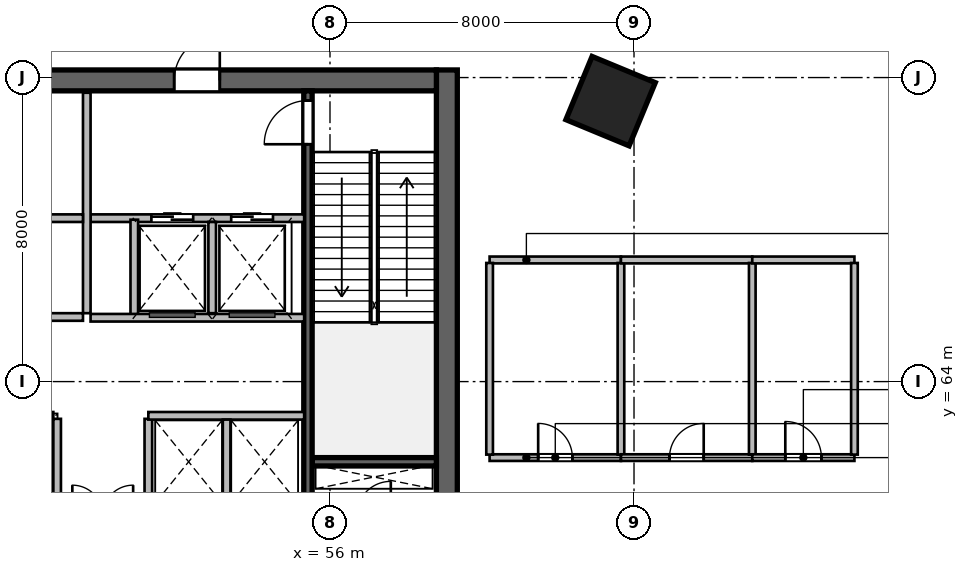
"""IFC4 building model, lengths in metres.
Left out: names, types, materials, properties, quantities, classifications, styles, units other than length and angle.
Written with IfcOpenShell. Run it as: python <this file> out.ifc"""

import sys

from ifc_helpers import new_model, si_unit, direction, frame, frame_2d, origin, origin_2d, place, context, subcontext, project, spatial, rectangle, extrude, source, transform, mapped, element, fill, save


model = new_model("IFC4")
c1 = context("Model", 3, precision=1e-05, world=origin(), true_north=direction((0.0, 1.0)))
c2 = subcontext(c1, "Body", "Model", "MODEL_VIEW")
j1 = project(units=[si_unit("LENGTHUNIT", "METRE"), si_unit("PLANEANGLEUNIT", "RADIAN")], contexts=[c1])
p1 = place(None, origin())
s1 = spatial("IfcSite", under=j1, at=p1, CompositionType="ELEMENT")
p2 = place(p1, origin())
s2 = spatial("IfcBuilding", under=s1, at=p2, CompositionType="ELEMENT")
p3 = place(p2, frame((0.0, 0.0, 18.0)))
s3 = spatial("IfcBuildingStorey", under=s2, at=p3, CompositionType="ELEMENT", Elevation=18.0)
m1 = source(origin(), c2, "Body", "SweptSolid", [
    extrude(rectangle(XDim=12.0, YDim=0.55, at=frame_2d((6.0, 0.0))), origin(), (0.0, 0.0, 1.0), 6.0),
])
p4 = place(p3, frame((59.075, 60.2, 0.0), z_axis=(0.0, 0.0, 1.0), x_axis=(0.0, 1.0, 0.0)))
e1 = element("IfcWall", 1, at=p4, inside=s3, PredefinedType="SHEAR", context=c2, shape_type="MappedRepresentation", body=[
    mapped(m1, transform((0.0, 0.0, 0.0), scale=1.0)),
])
m2 = source(origin(), c2, "Body", "SweptSolid", [
    extrude(rectangle(XDim=21.6, YDim=0.55, at=frame_2d((10.8, 0.0))), origin(), (0.0, 0.0, 1.0), 6.0),
])
p5 = place(p3, frame((37.2, 71.925, 0.0), z_axis=(0.0, 0.0, 1.0), x_axis=(1.0, 0.0, 0.0)))
e2 = element("IfcWall", 2, at=p5, inside=s3, PredefinedType="SHEAR", context=c2, shape_type="MappedRepresentation", body=[
    mapped(m2, transform((0.0, 0.0, 0.0), scale=1.0)),
])
p6 = place(p5, frame((1.2, 0.0, 0.0)))
e3 = element("IfcOpeningElement", 3, at=p6, cuts=e2, PredefinedType="OPENING", context=c2, shape_type="SweptSolid", body=[
    extrude(rectangle(XDim=0.9, YDim=2.1, at=frame_2d((0.45, 1.05))), frame((0.0, 0.285, 0.0), z_axis=(0.0, -1.0, 0.0), x_axis=(1.0, 0.0, 0.0)), (0.0, 0.0, 1.0), 0.57),
])
p7 = place(p5, frame((14.7, 0.0, 0.0)))
e4 = element("IfcOpeningElement", 4, at=p7, cuts=e2, PredefinedType="OPENING", context=c2, shape_type="SweptSolid", body=[
    extrude(rectangle(XDim=1.2, YDim=2.15, at=frame_2d((0.6, 1.075))), frame((0.0, 0.285, 0.0), z_axis=(0.0, -1.0, 0.0), x_axis=(1.0, 0.0, 0.0)), (0.0, 0.0, 1.0), 0.57),
])
p8 = place(p5, frame((4.15, 0.0, 0.0)))
e5 = element("IfcOpeningElement", 5, at=p8, cuts=e2, PredefinedType="OPENING", context=c2, shape_type="SweptSolid", body=[
    extrude(rectangle(XDim=1.3, YDim=2.15, at=frame_2d((0.65, 1.075))), frame((0.0, 0.285, 0.0), z_axis=(0.0, -1.0, 0.0), x_axis=(1.0, 0.0, 0.0)), (0.0, 0.0, 1.0), 0.57),
])
p9 = place(p5, frame((7.1, 0.0, 0.0)))
e6 = element("IfcOpeningElement", 6, at=p9, cuts=e2, PredefinedType="OPENING", context=c2, shape_type="SweptSolid", body=[
    extrude(rectangle(XDim=0.9, YDim=2.1, at=frame_2d((0.45, 1.05))), frame((0.0, 0.285, 0.0), z_axis=(0.0, -1.0, 0.0), x_axis=(1.0, 0.0, 0.0)), (0.0, 0.0, 1.0), 0.57),
])
m3 = source(origin(), c2, "Body", "SweptSolid", [
    extrude(rectangle(XDim=3.27, YDim=0.22, at=frame_2d((1.635, 0.0))), origin(), (0.0, 0.0, 1.0), 6.0),
])
p10 = place(p3, frame((55.53, 61.89, 0.0), z_axis=(0.0, 0.0, 1.0), x_axis=(1.0, 0.0, 0.0)))
e7 = element("IfcWall", 7, at=p10, inside=s3, PredefinedType="SHEAR", context=c2, shape_type="MappedRepresentation", body=[
    mapped(m3, transform((0.0, 0.0, 0.0), scale=1.0)),
])
m4 = source(origin(), c2, "Body", "SweptSolid", [
    extrude(rectangle(XDim=10.9, YDim=0.22, at=frame_2d((5.45, 0.0))), origin(), (0.0, 0.0, 1.0), 6.0),
])
p11 = place(p3, frame((55.42, 60.75, 0.0), z_axis=(0.0, 0.0, 1.0), x_axis=(0.0, 1.0, 0.0)))
e8 = element("IfcWall", 8, at=p11, inside=s3, PredefinedType="SHEAR", context=c2, shape_type="MappedRepresentation", body=[
    mapped(m4, transform((0.0, 0.0, 0.0), scale=1.0)),
])
p12 = place(p11, frame((9.495, 0.0, 0.0)))
e9 = element("IfcOpeningElement", 9, at=p12, cuts=e8, PredefinedType="OPENING", context=c2, shape_type="SweptSolid", body=[
    extrude(rectangle(XDim=1.15, YDim=2.15, at=frame_2d((0.575, 1.075))), frame((0.0, 0.12, 0.0), z_axis=(0.0, -1.0, 0.0), x_axis=(1.0, 0.0, 0.0)), (0.0, 0.0, 1.0), 0.24),
])
m5 = source(origin(), c2, "Body", "SweptSolid", [
    extrude(rectangle(XDim=1.8, YDim=1.8, at=origin_2d()), origin(), (0.0, 0.0, 1.0), 6.0),
])
p13 = place(p3, frame((63.384, 71.379, 0.0), z_axis=(0.0, 0.0, 1.0), x_axis=(0.382683432365, 0.923879532511, 0.0)))
e10 = element("IfcColumn", 10, at=p13, inside=s3, PredefinedType="COLUMN", context=c2, shape_type="MappedRepresentation", body=[
    mapped(m5, transform((0.0, 0.0, 0.0), scale=1.0)),
])
m6 = source(origin(), c2, "Body", "SweptSolid", [
    extrude(rectangle(XDim=5.667, YDim=0.35, at=frame_2d((2.833, 0.0))), origin(), (0.0, 0.0, 1.0), 5.62),
])
p14 = place(p3, frame((75.698, 72.147, 0.0), z_axis=(0.0, 0.0, 1.0), x_axis=(-0.873233089296, 0.487302751642, 0.0)))
e11 = element("IfcWall", 11, at=p14, inside=s3, PredefinedType="SOLIDWALL", context=c2, shape_type="MappedRepresentation", body=[
    mapped(m6, transform((0.0, 0.0, 0.0), scale=1.0)),
])
m7 = source(origin(), c2, "Body", "SweptSolid", [
    extrude(rectangle(XDim=2.24, YDim=0.2, at=frame_2d((1.12, 0.0))), origin(), (0.0, 0.0, 1.0), 5.62),
])
for number, where, z_axis, x_axis in (
    (12, (48.82, 60.78, 0.0), (0.0, 0.0, 1.0), (0.0, 1.0, 0.0)),
    (13, (51.22, 60.78, 0.0), (0.0, 0.0, 1.0), (0.0, 1.0, 0.0)),
):
    element("IfcWall", number, at=place(p3, frame(where, z_axis=z_axis, x_axis=x_axis)), inside=s3, PredefinedType="SOLIDWALL", context=c2, shape_type="MappedRepresentation", body=[
        mapped(m7, transform((0.0, 0.0, 0.0), scale=1.0)),
    ])
m8 = source(origin(), c2, "Body", "SweptSolid", [
    extrude(rectangle(XDim=5.62, YDim=0.2, at=frame_2d((2.81, 0.0))), origin(), (0.0, 0.0, 1.0), 5.62),
])
p15 = place(p3, frame((49.7, 68.3, 0.0), z_axis=(0.0, 0.0, 1.0), x_axis=(1.0, 0.0, 0.0)))
e14 = element("IfcWall", 14, at=p15, inside=s3, PredefinedType="SOLIDWALL", context=c2, shape_type="MappedRepresentation", body=[
    mapped(m8, transform((0.0, 0.0, 0.0), scale=1.0)),
])
p16 = place(p15, frame((1.6, 0.0, 0.0)))
e15 = element("IfcOpeningElement", 15, at=p16, cuts=e14, PredefinedType="OPENING", context=c2, shape_type="SweptSolid", body=[
    extrude(rectangle(XDim=1.1, YDim=2.15, at=frame_2d((0.55, 1.075))), frame((0.0, 0.11, 0.0), z_axis=(0.0, -1.0, 0.0), x_axis=(1.0, 0.0, 0.0)), (0.0, 0.0, 1.0), 0.22),
])
p17 = place(p15, frame((3.7, 0.0, 0.0)))
e16 = element("IfcOpeningElement", 16, at=p17, cuts=e14, PredefinedType="OPENING", context=c2, shape_type="SweptSolid", body=[
    extrude(rectangle(XDim=1.1, YDim=2.15, at=frame_2d((0.55, 1.075))), frame((0.0, 0.11, 0.0), z_axis=(0.0, -1.0, 0.0), x_axis=(1.0, 0.0, 0.0)), (0.0, 0.0, 1.0), 0.22),
])
m9 = source(origin(), c2, "Body", "SweptSolid", [
    extrude(rectangle(XDim=5.8, YDim=0.2, at=frame_2d((2.9, 0.0))), origin(), (0.0, 0.0, 1.0), 5.62),
])
p18 = place(p3, frame((49.6, 65.8, 0.0), z_axis=(0.0, 0.0, 1.0), x_axis=(0.0, 1.0, 0.0)))
e17 = element("IfcWall", 17, at=p18, inside=s3, PredefinedType="SOLIDWALL", context=c2, shape_type="MappedRepresentation", body=[
    mapped(m9, transform((0.0, 0.0, 0.0), scale=1.0)),
])
m10 = source(origin(), c2, "Body", "SweptSolid", [
    extrude(rectangle(XDim=2.58, YDim=0.2, at=frame_2d((1.29, 0.0))), origin(), (0.0, 0.0, 1.0), 5.62),
])
p19 = place(p3, frame((50.85, 65.68, 0.0), z_axis=(0.0, 0.0, 1.0), x_axis=(0.0, 1.0, 0.0)))
e18 = element("IfcWall", 18, at=p19, inside=s3, PredefinedType="SOLIDWALL", context=c2, shape_type="MappedRepresentation", body=[
    mapped(m10, transform((0.0, 0.0, 0.0), scale=1.0)),
])
m11 = source(origin(), c2, "Body", "SweptSolid", [
    extrude(rectangle(XDim=2.4, YDim=0.2, at=frame_2d((1.2, 0.0))), origin(), (0.0, 0.0, 1.0), 5.62),
])
p20 = place(p3, frame((52.9, 65.8, 0.0), z_axis=(0.0, 0.0, 1.0), x_axis=(0.0, 1.0, 0.0)))
e19 = element("IfcWall", 19, at=p20, inside=s3, PredefinedType="SOLIDWALL", context=c2, shape_type="MappedRepresentation", body=[
    mapped(m11, transform((0.0, 0.0, 0.0), scale=1.0)),
])
p21 = place(p3, frame((49.7, 65.68, 0.0), z_axis=(0.0, 0.0, 1.0), x_axis=(1.0, 0.0, 0.0)))
e20 = element("IfcWall", 20, at=p21, inside=s3, PredefinedType="SOLIDWALL", context=c2, shape_type="MappedRepresentation", body=[
    mapped(m8, transform((0.0, 0.0, 0.0), scale=1.0)),
])
m12 = source(origin(), c2, "Body", "SweptSolid", [
    extrude(rectangle(XDim=8.8, YDim=0.2, at=frame_2d((4.4, 0.0))), origin(), (0.0, 0.0, 1.0), 5.62),
])
p22 = place(p3, frame((40.7, 68.3, 0.0), z_axis=(0.0, 0.0, 1.0), x_axis=(1.0, 0.0, 0.0)))
e21 = element("IfcWall", 21, at=p22, inside=s3, PredefinedType="SOLIDWALL", context=c2, shape_type="MappedRepresentation", body=[
    mapped(m12, transform((0.0, 0.0, 0.0), scale=1.0)),
])
m13 = source(origin(), c2, "Body", "SweptSolid", [
    extrude(rectangle(XDim=8.02, YDim=0.2, at=frame_2d((4.01, 0.0))), origin(), (0.0, 0.0, 1.0), 5.62),
])
p23 = place(p3, frame((40.7, 63.1, 0.0), z_axis=(0.0, 0.0, 1.0), x_axis=(1.0, 0.0, 0.0)))
e22 = element("IfcWall", 22, at=p23, inside=s3, PredefinedType="SOLIDWALL", context=c2, shape_type="MappedRepresentation", body=[
    mapped(m13, transform((0.0, 0.0, 0.0), scale=1.0)),
])
p24 = place(p23, frame((0.72, 0.0, 0.0)))
e23 = element("IfcOpeningElement", 23, at=p24, cuts=e22, PredefinedType="OPENING", context=c2, shape_type="SweptSolid", body=[
    extrude(rectangle(XDim=1.0, YDim=2.15, at=frame_2d((0.5, 1.075))), frame((0.0, 0.11, 0.0), z_axis=(0.0, -1.0, 0.0), x_axis=(1.0, 0.0, 0.0)), (0.0, 0.0, 1.0), 0.22),
])
p25 = place(p23, frame((2.62, 0.0, 0.0)))
e24 = element("IfcOpeningElement", 24, at=p25, cuts=e22, PredefinedType="OPENING", context=c2, shape_type="SweptSolid", body=[
    extrude(rectangle(XDim=1.0, YDim=2.15, at=frame_2d((0.5, 1.075))), frame((0.0, 0.11, 0.0), z_axis=(0.0, -1.0, 0.0), x_axis=(1.0, 0.0, 0.0)), (0.0, 0.0, 1.0), 0.22),
])
p26 = place(p23, frame((4.55, 0.0, 0.0)))
e25 = element("IfcOpeningElement", 25, at=p26, cuts=e22, PredefinedType="OPENING", context=c2, shape_type="SweptSolid", body=[
    extrude(rectangle(XDim=1.0, YDim=2.15, at=frame_2d((0.5, 1.075))), frame((0.0, 0.11, 0.0), z_axis=(0.0, -1.0, 0.0), x_axis=(1.0, 0.0, 0.0)), (0.0, 0.0, 1.0), 0.22),
])
p27 = place(p23, frame((6.55, 0.0, 0.0)))
e26 = element("IfcOpeningElement", 26, at=p27, cuts=e22, PredefinedType="OPENING", context=c2, shape_type="SweptSolid", body=[
    extrude(rectangle(XDim=1.0, YDim=2.15, at=frame_2d((0.5, 1.075))), frame((0.0, 0.11, 0.0), z_axis=(0.0, -1.0, 0.0), x_axis=(1.0, 0.0, 0.0)), (0.0, 0.0, 1.0), 0.22),
])
m14 = source(origin(), c2, "Body", "SweptSolid", [
    extrude(rectangle(XDim=4.1, YDim=0.2, at=frame_2d((2.05, 0.0))), origin(), (0.0, 0.0, 1.0), 5.62),
])
p28 = place(p3, frame((51.22, 63.1, 0.0), z_axis=(0.0, 0.0, 1.0), x_axis=(1.0, 0.0, 0.0)))
e27 = element("IfcWall", 27, at=p28, inside=s3, PredefinedType="SOLIDWALL", context=c2, shape_type="MappedRepresentation", body=[
    mapped(m14, transform((0.0, 0.0, 0.0), scale=1.0)),
])
m15 = source(origin(), c2, "Body", "SweptSolid", [
    extrude(rectangle(XDim=2.2, YDim=0.2, at=frame_2d((1.1, 0.0))), origin(), (0.0, 0.0, 1.0), 5.62),
])
p29 = place(p3, frame((53.28, 60.8, 0.0), z_axis=(0.0, 0.0, 1.0), x_axis=(0.0, 1.0, 0.0)))
e28 = element("IfcWall", 28, at=p29, inside=s3, PredefinedType="SOLIDWALL", context=c2, shape_type="MappedRepresentation", body=[
    mapped(m15, transform((0.0, 0.0, 0.0), scale=1.0)),
])
p30 = place(p3, frame((40.7, 65.7, 0.0), z_axis=(0.0, 0.0, 1.0), x_axis=(1.0, 0.0, 0.0)))
e29 = element("IfcWall", 29, at=p30, inside=s3, PredefinedType="SOLIDWALL", context=c2, shape_type="MappedRepresentation", body=[
    mapped(m12, transform((0.0, 0.0, 0.0), scale=1.0)),
])
p31 = place(p30, frame((3.8, 0.0, 0.0)))
e30 = element("IfcOpeningElement", 30, at=p31, cuts=e29, PredefinedType="OPENING", context=c2, shape_type="SweptSolid", body=[
    extrude(rectangle(XDim=0.95, YDim=2.15, at=frame_2d((0.475, 1.075))), frame((0.0, 0.11, 0.0), z_axis=(0.0, -1.0, 0.0), x_axis=(1.0, 0.0, 0.0)), (0.0, 0.0, 1.0), 0.22),
])
m16 = source(origin(), c2, "Body", "SweptSolid", [
    extrude(rectangle(XDim=3.456, YDim=0.175, at=frame_2d((1.728, 0.0))), origin(), (0.0, 0.0, 1.0), 5.62),
])
p32 = place(p3, frame((60.2, 62.0, 0.0), z_axis=(0.0, 0.0, 1.0), x_axis=(1.0, 0.0, 0.0)))
e31 = element("IfcWall", 31, at=p32, inside=s3, PredefinedType="PARTITIONING", context=c2, shape_type="MappedRepresentation", body=[
    mapped(m16, transform((0.0, 0.0, 0.0), scale=1.0)),
])
p33 = place(p32, frame((1.278, 0.0, 0.0)))
e32 = element("IfcOpeningElement", 32, at=p33, cuts=e31, PredefinedType="OPENING", context=c2, shape_type="SweptSolid", body=[
    extrude(rectangle(XDim=0.9, YDim=2.08, at=frame_2d((0.45, 1.04))), frame((0.0, 0.098, 0.0), z_axis=(0.0, -1.0, 0.0), x_axis=(1.0, 0.0, 0.0)), (0.0, 0.0, 1.0), 0.195),
])
m17 = source(origin(), c2, "Body", "SweptSolid", [
    extrude(rectangle(XDim=3.456, YDim=0.18, at=frame_2d((1.728, 0.0))), origin(), (0.0, 0.0, 1.0), 5.62),
])
p34 = place(p3, frame((60.2, 67.2, 0.0), z_axis=(0.0, 0.0, 1.0), x_axis=(1.0, 0.0, 0.0)))
e33 = element("IfcWall", 33, at=p34, inside=s3, PredefinedType="PLUMBINGWALL", context=c2, shape_type="MappedRepresentation", body=[
    mapped(m17, transform((0.0, 0.0, 0.0), scale=1.0)),
])
m18 = source(origin(), c2, "Body", "SweptSolid", [
    extrude(rectangle(XDim=5.043, YDim=0.175, at=frame_2d((2.521, 0.0))), origin(), (0.0, 0.0, 1.0), 5.62),
])
for number, where, z_axis, x_axis in (
    (34, (60.2, 62.079, 0.0), (0.0, 0.0, 1.0), (0.0, 1.0, 0.0)),
    (35, (63.656, 62.079, 0.0), (0.0, 0.0, 1.0), (0.0, 1.0, 0.0)),
):
    element("IfcWall", number, at=place(p3, frame(where, z_axis=z_axis, x_axis=x_axis)), inside=s3, PredefinedType="PARTITIONING", context=c2, shape_type="MappedRepresentation", body=[
        mapped(m18, transform((0.0, 0.0, 0.0), scale=1.0)),
    ])
p35 = place(p3, frame((63.656, 62.0, 0.0), z_axis=(0.0, 0.0, 1.0), x_axis=(1.0, 0.0, 0.0)))
e36 = element("IfcWall", 36, at=p35, inside=s3, PredefinedType="PARTITIONING", context=c2, shape_type="MappedRepresentation", body=[
    mapped(m16, transform((0.0, 0.0, 0.0), scale=1.0)),
])
p36 = place(p35, frame((1.278, 0.0, 0.0)))
e37 = element("IfcOpeningElement", 37, at=p36, cuts=e36, PredefinedType="OPENING", context=c2, shape_type="SweptSolid", body=[
    extrude(rectangle(XDim=0.9, YDim=2.08, at=frame_2d((0.45, 1.04))), frame((0.0, 0.098, 0.0), z_axis=(0.0, -1.0, 0.0), x_axis=(1.0, 0.0, 0.0)), (0.0, 0.0, 1.0), 0.195),
])
p37 = place(p3, frame((63.656, 67.2, 0.0), z_axis=(0.0, 0.0, 1.0), x_axis=(1.0, 0.0, 0.0)))
e38 = element("IfcWall", 38, at=p37, inside=s3, PredefinedType="PLUMBINGWALL", context=c2, shape_type="MappedRepresentation", body=[
    mapped(m17, transform((0.0, 0.0, 0.0), scale=1.0)),
])
p38 = place(p3, frame((67.112, 62.079, 0.0), z_axis=(0.0, 0.0, 1.0), x_axis=(0.0, 1.0, 0.0)))
e39 = element("IfcWall", 39, at=p38, inside=s3, PredefinedType="PARTITIONING", context=c2, shape_type="MappedRepresentation", body=[
    mapped(m18, transform((0.0, 0.0, 0.0), scale=1.0)),
])
m19 = source(origin(), c2, "Body", "SweptSolid", [
    extrude(rectangle(XDim=2.688, YDim=0.175, at=frame_2d((1.344, 0.0))), origin(), (0.0, 0.0, 1.0), 5.62),
])
p39 = place(p3, frame((67.112, 62.0, 0.0), z_axis=(0.0, 0.0, 1.0), x_axis=(1.0, 0.0, 0.0)))
e40 = element("IfcWall", 40, at=p39, inside=s3, PredefinedType="PARTITIONING", context=c2, shape_type="MappedRepresentation", body=[
    mapped(m19, transform((0.0, 0.0, 0.0), scale=1.0)),
])
p40 = place(p39, frame((0.869, 0.0, 0.0)))
e41 = element("IfcOpeningElement", 41, at=p40, cuts=e40, PredefinedType="OPENING", context=c2, shape_type="SweptSolid", body=[
    extrude(rectangle(XDim=0.95, YDim=2.12, at=frame_2d((0.475, 1.06))), frame((0.0, 0.098, 0.0), z_axis=(0.0, -1.0, 0.0), x_axis=(1.0, 0.0, 0.0)), (0.0, 0.0, 1.0), 0.195),
])
m20 = source(origin(), c2, "Body", "SweptSolid", [
    extrude(rectangle(XDim=2.688, YDim=0.18, at=frame_2d((1.344, 0.0))), origin(), (0.0, 0.0, 1.0), 5.62),
])
p41 = place(p3, frame((67.112, 67.2, 0.0), z_axis=(0.0, 0.0, 1.0), x_axis=(1.0, 0.0, 0.0)))
e42 = element("IfcWall", 42, at=p41, inside=s3, PredefinedType="PLUMBINGWALL", context=c2, shape_type="MappedRepresentation", body=[
    mapped(m20, transform((0.0, 0.0, 0.0), scale=1.0)),
])
p42 = place(p3, frame((69.8, 62.079, 0.0), z_axis=(0.0, 0.0, 1.0), x_axis=(0.0, 1.0, 0.0)))
e43 = element("IfcWall", 43, at=p42, inside=s3, PredefinedType="PARTITIONING", context=c2, shape_type="MappedRepresentation", body=[
    mapped(m18, transform((0.0, 0.0, 0.0), scale=1.0)),
])
m21 = source(origin(), c2, "Body", "SweptSolid", [
    extrude(rectangle(XDim=1.15, YDim=2.15, at=frame_2d((0.575, 1.075))), frame((0.0, 0.025, 0.0), z_axis=(0.0, -1.0, 0.0), x_axis=(1.0, 0.0, 0.0)), (0.0, 0.0, 1.0), 0.05),
])
p43 = place(p12, origin())
e44 = element("IfcDoor", 44, at=p43, inside=s3, OperationType="SINGLE_SWING_LEFT", PredefinedType="DOOR", context=c2, shape_type="MappedRepresentation", body=[
    mapped(m21, transform((0.0, 0.0, 0.0), scale=1.0)),
])
fill(e9, e44)
m22 = source(origin(), c2, "Body", "SweptSolid", [
    extrude(rectangle(XDim=1.2, YDim=2.15, at=frame_2d((0.6, 1.075))), frame((0.0, 0.025, 0.0), z_axis=(0.0, -1.0, 0.0), x_axis=(1.0, 0.0, 0.0)), (0.0, 0.0, 1.0), 0.05),
])
p44 = place(p7, origin())
e45 = element("IfcDoor", 45, at=p44, inside=s3, OperationType="SINGLE_SWING_RIGHT", PredefinedType="DOOR", context=c2, shape_type="MappedRepresentation", body=[
    mapped(m22, transform((0.0, 0.0, 0.0), scale=1.0)),
])
fill(e4, e45)
m23 = source(origin(), c2, "Body", "SweptSolid", [
    extrude(rectangle(XDim=1.1, YDim=2.15, at=frame_2d((0.55, 1.075))), frame((0.0, 0.025, 0.0), z_axis=(0.0, -1.0, 0.0), x_axis=(1.0, 0.0, 0.0)), (0.0, 0.0, 1.0), 0.05),
])
p45 = place(p16, origin())
e46 = element("IfcDoor", 46, at=p45, inside=s3, OperationType="DOUBLE_DOOR_SLIDING", PredefinedType="DOOR", context=c2, shape_type="MappedRepresentation", body=[
    mapped(m23, transform((0.0, 0.0, 0.0), scale=1.0)),
])
fill(e15, e46)
p46 = place(p17, origin())
e47 = element("IfcDoor", 47, at=p46, inside=s3, OperationType="DOUBLE_DOOR_SLIDING", PredefinedType="DOOR", context=c2, shape_type="MappedRepresentation", body=[
    mapped(m23, transform((0.0, 0.0, 0.0), scale=1.0)),
])
fill(e16, e47)
m24 = source(origin(), c2, "Body", "SweptSolid", [
    extrude(rectangle(XDim=0.9, YDim=2.08, at=frame_2d((0.45, 1.04))), frame((0.0, 0.025, 0.0), z_axis=(0.0, -1.0, 0.0), x_axis=(1.0, 0.0, 0.0)), (0.0, 0.0, 1.0), 0.05),
])
p47 = place(p33, origin())
e48 = element("IfcDoor", 48, at=p47, inside=s3, OperationType="SINGLE_SWING_LEFT", PredefinedType="DOOR", context=c2, shape_type="MappedRepresentation", body=[
    mapped(m24, transform((0.0, 0.0, 0.0), scale=1.0)),
])
fill(e32, e48)
p48 = place(p36, origin())
e49 = element("IfcDoor", 49, at=p48, inside=s3, OperationType="SINGLE_SWING_RIGHT", PredefinedType="DOOR", context=c2, shape_type="MappedRepresentation", body=[
    mapped(m24, transform((0.0, 0.0, 0.0), scale=1.0)),
])
fill(e37, e49)
m25 = source(origin(), c2, "Body", "SweptSolid", [
    extrude(rectangle(XDim=0.95, YDim=2.12, at=frame_2d((0.475, 1.06))), frame((0.0, 0.025, 0.0), z_axis=(0.0, -1.0, 0.0), x_axis=(1.0, 0.0, 0.0)), (0.0, 0.0, 1.0), 0.05),
])
p49 = place(p40, origin())
e50 = element("IfcDoor", 50, at=p49, inside=s3, OperationType="SINGLE_SWING_LEFT", PredefinedType="DOOR", context=c2, shape_type="MappedRepresentation", body=[
    mapped(m25, transform((0.0, 0.0, 0.0), scale=1.0)),
])
fill(e41, e50)
save(model, sys.argv[1])
